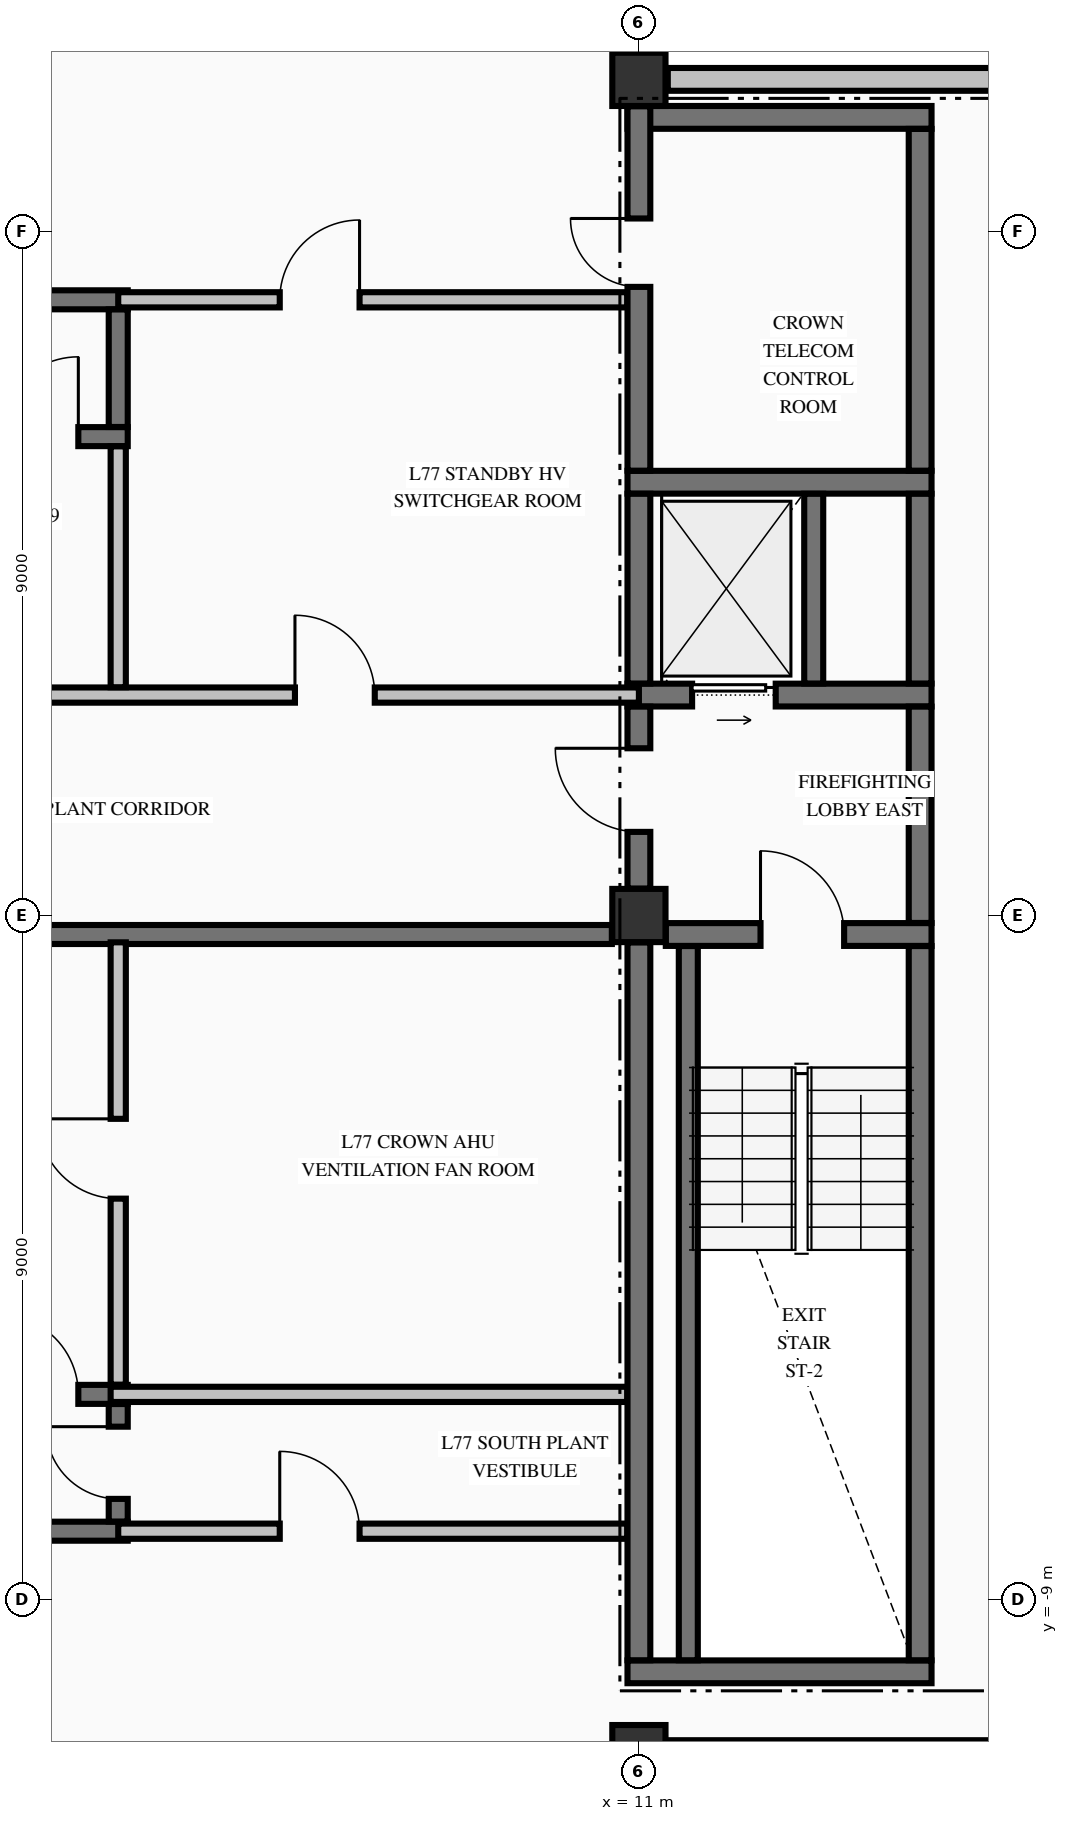
"""IFC4 building model, lengths in metres.
Left out: names, types, materials, properties, quantities, classifications, styles, units other than length and angle.
Written with IfcOpenShell. Run it as: python <this file> out.ifc"""

import sys

from ifc_helpers import new_model, si_unit, direction, frame, frame_2d, origin, origin_2d, place, context, subcontext, project, spatial, rectangle, extrude, element, fill, save


model = new_model("IFC4")
c1 = context("Model", 3, precision=1e-05, world=origin(), true_north=direction((0.0, 1.0)))
c2 = subcontext(c1, "Body", "Model", "MODEL_VIEW")
j1 = project(units=[si_unit("LENGTHUNIT", "METRE"), si_unit("PLANEANGLEUNIT", "RADIAN")], contexts=[c1])
p1 = place(None, origin())
s1 = spatial("IfcSite", under=j1, at=p1, CompositionType="ELEMENT")
p2 = place(p1, origin())
s2 = spatial("IfcBuilding", under=s1, at=p2, CompositionType="ELEMENT")
p3 = place(p2, frame((0.0, 0.0, 287.92)))
s3 = spatial("IfcBuildingStorey", under=s2, at=p3, CompositionType="ELEMENT", Elevation=287.92)
for number, where, z_axis, x_axis in (
    (1, (11.0, -11.0, -0.325), (0.0, 0.0, 1.0), (1.0, 0.0, 0.0)),
    (2, (11.0, 11.0, -0.325), (0.0, 0.0, 1.0), (1.0, 0.0, 0.0)),
    (3, (11.0, 0.0, -0.325), (0.0, 0.0, 1.0), (1.0, 0.0, 0.0)),
):
    element("IfcColumn", number, at=place(p3, frame(where, z_axis=z_axis, x_axis=x_axis)), inside=s3, PredefinedType="COLUMN", context=c2, shape_type="SweptSolid", body=[
        extrude(rectangle(XDim=0.7, YDim=0.7, at=origin_2d()), origin(), (0.0, 0.0, 1.0), 3.06),
    ])
for number, where, z_axis, x_axis in (
    (4, (11.38, -11.0, 0.0), (0.0, 0.0, 1.0), (1.0, 0.0, 0.0)),
    (5, (16.62, 11.0, 0.0), (0.0, 0.0, 1.0), (-1.0, 0.0, 0.0)),
):
    element("IfcWall", number, at=place(p3, frame(where, z_axis=z_axis, x_axis=x_axis)), inside=s3, PredefinedType="STANDARD", context=c2, shape_type="SweptSolid", body=[
        extrude(rectangle(XDim=5.24, YDim=0.3, at=frame_2d((2.62, 0.0))), origin(), (0.0, 0.0, 1.0), 1.077),
    ])
p4 = place(p3, frame((10.85, -9.95, 0.0), z_axis=(0.0, 0.0, 1.0), x_axis=(1.0, 0.0, 0.0)))
e6 = element("IfcWall", 6, at=p4, inside=s3, PredefinedType="SHEAR", context=c2, shape_type="SweptSolid", body=[
    extrude(rectangle(XDim=4.0, YDim=0.3, at=frame_2d((2.0, 0.0))), origin(), (0.0, 0.0, 1.0), 2.735),
])
p5 = place(p3, frame((-4.475, -8.1, 0.0), z_axis=(0.0, 0.0, 1.0), x_axis=(1.0, 0.0, 0.0)))
e7 = element("IfcWall", 7, at=p5, inside=s3, PredefinedType="SOLIDWALL", context=c2, shape_type="SweptSolid", body=[
    extrude(rectangle(XDim=8.75, YDim=0.25, at=frame_2d((4.375, 0.0))), origin(), (0.0, 0.0, 1.0), 2.735),
])
p6 = place(p3, frame((-4.475, -6.3, 0.0), z_axis=(0.0, 0.0, 1.0), x_axis=(1.0, 0.0, 0.0)))
e8 = element("IfcWall", 8, at=p6, inside=s3, PredefinedType="SOLIDWALL", context=c2, shape_type="SweptSolid", body=[
    extrude(rectangle(XDim=8.75, YDim=0.25, at=frame_2d((4.375, 0.0))), origin(), (0.0, 0.0, 1.0), 2.735),
])
p7 = place(p6, frame((7.05, 0.0, 0.0)))
e9 = element("IfcOpeningElement", 9, at=p7, cuts=e8, PredefinedType="OPENING", context=c2, shape_type="SweptSolid", body=[
    extrude(rectangle(XDim=1.05, YDim=2.15, at=frame_2d((0.525, 1.075))), frame((0.0, 0.135, 0.0), z_axis=(0.0, -1.0, 0.0), x_axis=(1.0, 0.0, 0.0)), (0.0, 0.0, 1.0), 0.27),
])
p8 = place(p3, frame((11.354, -0.25, 0.0), z_axis=(0.0, 0.0, 1.0), x_axis=(1.0, 0.0, 0.0)))
e10 = element("IfcWall", 10, at=p8, inside=s3, PredefinedType="SHEAR", context=c2, shape_type="SweptSolid", body=[
    extrude(rectangle(XDim=3.496, YDim=0.3, at=frame_2d((1.748, 0.0))), origin(), (0.0, 0.0, 1.0), 2.735),
])
p9 = place(p8, frame((1.246, 0.0, 0.0)))
e11 = element("IfcOpeningElement", 11, at=p9, cuts=e10, PredefinedType="OPENING", context=c2, shape_type="SweptSolid", body=[
    extrude(rectangle(XDim=1.1, YDim=2.15, at=frame_2d((0.55, 1.075))), frame((0.0, 0.16, 0.0), z_axis=(0.0, -1.0, 0.0), x_axis=(1.0, 0.0, 0.0)), (0.0, 0.0, 1.0), 0.32),
])
p10 = place(p3, frame((10.85, 2.9, 0.0), z_axis=(0.0, 0.0, 1.0), x_axis=(1.0, 0.0, 0.0)))
e12 = element("IfcWall", 12, at=p10, inside=s3, PredefinedType="SHEAR", context=c2, shape_type="SweptSolid", body=[
    extrude(rectangle(XDim=4.0, YDim=0.3, at=frame_2d((2.0, 0.0))), origin(), (0.0, 0.0, 1.0), 2.735),
])
p11 = place(p10, frame((0.85, 0.0, 0.0)))
e13 = element("IfcOpeningElement", 13, at=p11, cuts=e12, PredefinedType="OPENING", context=c2, shape_type="SweptSolid", body=[
    extrude(rectangle(XDim=1.1, YDim=2.2, at=frame_2d((0.55, 1.1))), frame((0.0, 0.16, 0.0), z_axis=(0.0, -1.0, 0.0), x_axis=(1.0, 0.0, 0.0)), (0.0, 0.0, 1.0), 0.32),
])
p12 = place(p3, frame((10.85, 5.7, 0.0), z_axis=(0.0, 0.0, 1.0), x_axis=(1.0, 0.0, 0.0)))
e14 = element("IfcWall", 14, at=p12, inside=s3, PredefinedType="SHEAR", context=c2, shape_type="SweptSolid", body=[
    extrude(rectangle(XDim=4.0, YDim=0.3, at=frame_2d((2.0, 0.0))), origin(), (0.0, 0.0, 1.0), 2.735),
])
p13 = place(p3, frame((-4.475, 6.3, 0.0), z_axis=(0.0, 0.0, 1.0), x_axis=(1.0, 0.0, 0.0)))
e15 = element("IfcWall", 15, at=p13, inside=s3, PredefinedType="SOLIDWALL", context=c2, shape_type="SweptSolid", body=[
    extrude(rectangle(XDim=8.75, YDim=0.25, at=frame_2d((4.375, 0.0))), origin(), (0.0, 0.0, 1.0), 2.735),
])
p14 = place(p13, frame((7.05, 0.0, 0.0)))
e16 = element("IfcOpeningElement", 16, at=p14, cuts=e15, PredefinedType="OPENING", context=c2, shape_type="SweptSolid", body=[
    extrude(rectangle(XDim=1.05, YDim=2.15, at=frame_2d((0.525, 1.075))), frame((0.0, 0.135, 0.0), z_axis=(0.0, -1.0, 0.0), x_axis=(1.0, 0.0, 0.0)), (0.0, 0.0, 1.0), 0.27),
])
p15 = place(p3, frame((-4.475, 8.1, 0.0), z_axis=(0.0, 0.0, 1.0), x_axis=(1.0, 0.0, 0.0)))
e17 = element("IfcWall", 17, at=p15, inside=s3, PredefinedType="SOLIDWALL", context=c2, shape_type="SweptSolid", body=[
    extrude(rectangle(XDim=8.75, YDim=0.25, at=frame_2d((4.375, 0.0))), origin(), (0.0, 0.0, 1.0), 2.735),
])
p16 = place(p3, frame((10.85, 10.5, 0.0), z_axis=(0.0, 0.0, 1.0), x_axis=(1.0, 0.0, 0.0)))
e18 = element("IfcWall", 18, at=p16, inside=s3, PredefinedType="SHEAR", context=c2, shape_type="SweptSolid", body=[
    extrude(rectangle(XDim=4.0, YDim=0.3, at=frame_2d((2.0, 0.0))), origin(), (0.0, 0.0, 1.0), 2.735),
])
p17 = place(p3, frame((4.15, -8.1, 0.0), z_axis=(0.0, 0.0, 1.0), x_axis=(1.0, 0.0, 0.0)))
e19 = element("IfcWall", 19, at=p17, inside=s3, PredefinedType="PARTITIONING", context=c2, shape_type="SweptSolid", body=[
    extrude(rectangle(XDim=6.697, YDim=0.2, at=frame_2d((3.349, 0.0))), origin(), (0.0, 0.0, 1.0), 2.735),
])
p18 = place(p17, frame((2.125, 0.0, 0.0)))
e20 = element("IfcOpeningElement", 20, at=p18, cuts=e19, PredefinedType="OPENING", context=c2, shape_type="SweptSolid", body=[
    extrude(rectangle(XDim=1.05, YDim=2.15, at=frame_2d((0.525, 1.075))), frame((0.0, 0.11, 0.0), z_axis=(0.0, -1.0, 0.0), x_axis=(1.0, 0.0, 0.0)), (0.0, 0.0, 1.0), 0.22),
])
p19 = place(p3, frame((4.05, -6.3, 0.0), z_axis=(0.0, 0.0, 1.0), x_axis=(1.0, 0.0, 0.0)))
e21 = element("IfcWall", 21, at=p19, inside=s3, PredefinedType="PARTITIONING", context=c2, shape_type="SweptSolid", body=[
    extrude(rectangle(XDim=6.797, YDim=0.2, at=frame_2d((3.398, 0.0))), origin(), (0.0, 0.0, 1.0), 2.735),
])
p20 = place(p3, frame((-10.644, -0.25, 0.0), z_axis=(0.0, 0.0, 1.0), x_axis=(1.0, 0.0, 0.0)))
e22 = element("IfcWall", 22, at=p20, inside=s3, PredefinedType="SOLIDWALL", context=c2, shape_type="SweptSolid", body=[
    extrude(rectangle(XDim=21.288, YDim=0.25, at=frame_2d((10.644, 0.0))), origin(), (0.0, 0.0, 1.0), 2.735),
])
p21 = place(p20, frame((7.594, 0.0, 0.0)))
e23 = element("IfcOpeningElement", 23, at=p21, cuts=e22, PredefinedType="OPENING", context=c2, shape_type="SweptSolid", body=[
    extrude(rectangle(XDim=0.95, YDim=2.02, at=frame_2d((0.475, 1.01))), frame((0.0, 0.135, 0.0), z_axis=(0.0, -1.0, 0.0), x_axis=(1.0, 0.0, 0.0)), (0.0, 0.0, 1.0), 0.27),
])
p22 = place(p3, frame((-11.0, 2.9, 0.0), z_axis=(0.0, 0.0, 1.0), x_axis=(1.0, 0.0, 0.0)))
e24 = element("IfcWall", 24, at=p22, inside=s3, PredefinedType="PARTITIONING", context=c2, shape_type="SweptSolid", body=[
    extrude(rectangle(XDim=22.0, YDim=0.2, at=frame_2d((11.0, 0.0))), origin(), (0.0, 0.0, 1.0), 2.735),
])
p23 = place(p22, frame((7.95, 0.0, 0.0)))
e25 = element("IfcOpeningElement", 25, at=p23, cuts=e24, PredefinedType="OPENING", context=c2, shape_type="SweptSolid", body=[
    extrude(rectangle(XDim=1.1, YDim=2.15, at=frame_2d((0.55, 1.075))), frame((0.0, 0.11, 0.0), z_axis=(0.0, -1.0, 0.0), x_axis=(1.0, 0.0, 0.0)), (0.0, 0.0, 1.0), 0.22),
])
p24 = place(p22, frame((17.475, 0.0, 0.0)))
e26 = element("IfcOpeningElement", 26, at=p24, cuts=e24, PredefinedType="OPENING", context=c2, shape_type="SweptSolid", body=[
    extrude(rectangle(XDim=1.05, YDim=2.15, at=frame_2d((0.525, 1.075))), frame((0.0, 0.11, 0.0), z_axis=(0.0, -1.0, 0.0), x_axis=(1.0, 0.0, 0.0)), (0.0, 0.0, 1.0), 0.22),
])
p25 = place(p22, frame((3.475, 0.0, 0.0)))
e27 = element("IfcOpeningElement", 27, at=p25, cuts=e24, PredefinedType="OPENING", context=c2, shape_type="SweptSolid", body=[
    extrude(rectangle(XDim=1.05, YDim=2.15, at=frame_2d((0.525, 1.075))), frame((0.0, 0.11, 0.0), z_axis=(0.0, -1.0, 0.0), x_axis=(1.0, 0.0, 0.0)), (0.0, 0.0, 1.0), 0.22),
])
p26 = place(p3, frame((4.15, 8.1, 0.0), z_axis=(0.0, 0.0, 1.0), x_axis=(1.0, 0.0, 0.0)))
e28 = element("IfcWall", 28, at=p26, inside=s3, PredefinedType="PARTITIONING", context=c2, shape_type="SweptSolid", body=[
    extrude(rectangle(XDim=6.697, YDim=0.2, at=frame_2d((3.349, 0.0))), origin(), (0.0, 0.0, 1.0), 2.735),
])
p27 = place(p26, frame((2.125, 0.0, 0.0)))
e29 = element("IfcOpeningElement", 29, at=p27, cuts=e28, PredefinedType="OPENING", context=c2, shape_type="SweptSolid", body=[
    extrude(rectangle(XDim=1.05, YDim=2.15, at=frame_2d((0.525, 1.075))), frame((0.0, 0.11, 0.0), z_axis=(0.0, -1.0, 0.0), x_axis=(1.0, 0.0, 0.0)), (0.0, 0.0, 1.0), 0.22),
])
p28 = place(p3, frame((4.15, -7.973, 0.0), z_axis=(0.0, 0.0, 1.0), x_axis=(0.0, 1.0, 0.0)))
e30 = element("IfcWall", 30, at=p28, inside=s3, PredefinedType="SOLIDWALL", context=c2, shape_type="SweptSolid", body=[
    extrude(rectangle(XDim=1.546, YDim=0.25, at=frame_2d((0.773, 0.0))), origin(), (0.0, 0.0, 1.0), 2.735),
])
p29 = place(p28, frame((0.298, 0.0, 0.0)))
e31 = element("IfcOpeningElement", 31, at=p29, cuts=e30, PredefinedType="OPENING", context=c2, shape_type="SweptSolid", body=[
    extrude(rectangle(XDim=0.95, YDim=2.15, at=frame_2d((0.475, 1.075))), frame((0.0, 0.135, 0.0), z_axis=(0.0, -1.0, 0.0), x_axis=(1.0, 0.0, 0.0)), (0.0, 0.0, 1.0), 0.27),
])
p30 = place(p3, frame((4.15, 6.427, 0.0), z_axis=(0.0, 0.0, 1.0), x_axis=(0.0, 1.0, 0.0)))
e32 = element("IfcWall", 32, at=p30, inside=s3, PredefinedType="SOLIDWALL", context=c2, shape_type="SweptSolid", body=[
    extrude(rectangle(XDim=1.546, YDim=0.25, at=frame_2d((0.773, 0.0))), origin(), (0.0, 0.0, 1.0), 2.735),
])
p31 = place(p3, frame((11.0, -9.798, 0.0), z_axis=(0.0, 0.0, 1.0), x_axis=(0.0, 1.0, 0.0)))
e33 = element("IfcWall", 33, at=p31, inside=s3, PredefinedType="SHEAR", context=c2, shape_type="SweptSolid", body=[
    extrude(rectangle(XDim=9.444, YDim=0.3, at=frame_2d((4.722, 0.0))), origin(), (0.0, 0.0, 1.0), 2.735),
])
p32 = place(p3, frame((11.0, 0.354, 0.0), z_axis=(0.0, 0.0, 1.0), x_axis=(0.0, 1.0, 0.0)))
e34 = element("IfcWall", 34, at=p32, inside=s3, PredefinedType="SHEAR", context=c2, shape_type="SweptSolid", body=[
    extrude(rectangle(XDim=2.394, YDim=0.3, at=frame_2d((1.197, 0.0))), origin(), (0.0, 0.0, 1.0), 2.735),
])
p33 = place(p32, frame((0.746, 0.0, 0.0)))
e35 = element("IfcOpeningElement", 35, at=p33, cuts=e34, PredefinedType="OPENING", context=c2, shape_type="SweptSolid", body=[
    extrude(rectangle(XDim=1.1, YDim=2.15, at=frame_2d((0.55, 1.075))), frame((0.0, 0.16, 0.0), z_axis=(0.0, -1.0, 0.0), x_axis=(1.0, 0.0, 0.0)), (0.0, 0.0, 1.0), 0.32),
])
p34 = place(p3, frame((11.0, 3.052, 0.0), z_axis=(0.0, 0.0, 1.0), x_axis=(0.0, 1.0, 0.0)))
e36 = element("IfcWall", 36, at=p34, inside=s3, PredefinedType="SHEAR", context=c2, shape_type="SweptSolid", body=[
    extrude(rectangle(XDim=2.496, YDim=0.3, at=frame_2d((1.248, 0.0))), origin(), (0.0, 0.0, 1.0), 2.735),
])
p35 = place(p3, frame((11.0, 5.852, 0.0), z_axis=(0.0, 0.0, 1.0), x_axis=(0.0, 1.0, 0.0)))
e37 = element("IfcWall", 37, at=p35, inside=s3, PredefinedType="SHEAR", context=c2, shape_type="SweptSolid", body=[
    extrude(rectangle(XDim=4.794, YDim=0.3, at=frame_2d((2.397, 0.0))), origin(), (0.0, 0.0, 1.0), 2.735),
])
p36 = place(p35, frame((2.418, 0.0, 0.0)))
e38 = element("IfcOpeningElement", 38, at=p36, cuts=e37, PredefinedType="OPENING", context=c2, shape_type="SweptSolid", body=[
    extrude(rectangle(XDim=0.9, YDim=2.15, at=frame_2d((0.45, 1.075))), frame((0.0, 0.16, 0.0), z_axis=(0.0, -1.0, 0.0), x_axis=(1.0, 0.0, 0.0)), (0.0, 0.0, 1.0), 0.32),
])
p37 = place(p3, frame((11.65, -9.798, 0.0), z_axis=(0.0, 0.0, 1.0), x_axis=(0.0, 1.0, 0.0)))
e39 = element("IfcWall", 39, at=p37, inside=s3, PredefinedType="SOLIDWALL", context=c2, shape_type="SweptSolid", body=[
    extrude(rectangle(XDim=9.396, YDim=0.25, at=frame_2d((4.698, 0.0))), origin(), (0.0, 0.0, 1.0), 2.735),
])
p38 = place(p3, frame((13.3, 3.052, 0.0), z_axis=(0.0, 0.0, 1.0), x_axis=(0.0, 1.0, 0.0)))
e40 = element("IfcWall", 40, at=p38, inside=s3, PredefinedType="SOLIDWALL", context=c2, shape_type="SweptSolid", body=[
    extrude(rectangle(XDim=2.496, YDim=0.25, at=frame_2d((1.248, 0.0))), origin(), (0.0, 0.0, 1.0), 2.735),
])
p39 = place(p3, frame((14.7, -9.798, 0.0), z_axis=(0.0, 0.0, 1.0), x_axis=(0.0, 1.0, 0.0)))
e41 = element("IfcWall", 41, at=p39, inside=s3, PredefinedType="SHEAR", context=c2, shape_type="SweptSolid", body=[
    extrude(rectangle(XDim=9.396, YDim=0.3, at=frame_2d((4.698, 0.0))), origin(), (0.0, 0.0, 1.0), 2.735),
])
p40 = place(p3, frame((14.7, -0.098, 0.0), z_axis=(0.0, 0.0, 1.0), x_axis=(0.0, 1.0, 0.0)))
e42 = element("IfcWall", 42, at=p40, inside=s3, PredefinedType="SHEAR", context=c2, shape_type="SweptSolid", body=[
    extrude(rectangle(XDim=2.846, YDim=0.3, at=frame_2d((1.423, 0.0))), origin(), (0.0, 0.0, 1.0), 2.735),
])
p41 = place(p3, frame((14.7, 3.052, 0.0), z_axis=(0.0, 0.0, 1.0), x_axis=(0.0, 1.0, 0.0)))
e43 = element("IfcWall", 43, at=p41, inside=s3, PredefinedType="SHEAR", context=c2, shape_type="SweptSolid", body=[
    extrude(rectangle(XDim=2.496, YDim=0.3, at=frame_2d((1.248, 0.0))), origin(), (0.0, 0.0, 1.0), 2.735),
])
p42 = place(p3, frame((14.7, 5.852, 0.0), z_axis=(0.0, 0.0, 1.0), x_axis=(0.0, 1.0, 0.0)))
e44 = element("IfcWall", 44, at=p42, inside=s3, PredefinedType="SHEAR", context=c2, shape_type="SweptSolid", body=[
    extrude(rectangle(XDim=4.496, YDim=0.3, at=frame_2d((2.248, 0.0))), origin(), (0.0, 0.0, 1.0), 2.735),
])
p43 = place(p3, frame((4.15, -6.172, 0.0), z_axis=(0.0, 0.0, 1.0), x_axis=(0.0, 1.0, 0.0)))
e45 = element("IfcWall", 45, at=p43, inside=s3, PredefinedType="PARTITIONING", context=c2, shape_type="SweptSolid", body=[
    extrude(rectangle(XDim=5.819, YDim=0.2, at=frame_2d((2.91, 0.0))), origin(), (0.0, 0.0, 1.0), 2.735),
])
p44 = place(p43, frame((2.447, 0.0, 0.0)))
e46 = element("IfcOpeningElement", 46, at=p44, cuts=e45, PredefinedType="OPENING", context=c2, shape_type="SweptSolid", body=[
    extrude(rectangle(XDim=1.05, YDim=2.15, at=frame_2d((0.525, 1.075))), frame((0.0, 0.11, 0.0), z_axis=(0.0, -1.0, 0.0), x_axis=(1.0, 0.0, 0.0)), (0.0, 0.0, 1.0), 0.22),
])
p45 = place(p3, frame((4.15, 3.003, 0.0), z_axis=(0.0, 0.0, 1.0), x_axis=(0.0, 1.0, 0.0)))
e47 = element("IfcWall", 47, at=p45, inside=s3, PredefinedType="PARTITIONING", context=c2, shape_type="SweptSolid", body=[
    extrude(rectangle(XDim=3.169, YDim=0.2, at=frame_2d((1.584, 0.0))), origin(), (0.0, 0.0, 1.0), 2.735),
])
p46 = place(p9, origin())
e48 = element("IfcDoor", 48, at=p46, inside=s3, OperationType="SINGLE_SWING_LEFT", PredefinedType="DOOR", context=c2, shape_type="SweptSolid", body=[
    extrude(rectangle(XDim=1.1, YDim=2.15, at=frame_2d((0.55, 1.075))), frame((0.0, 0.025, 0.0), z_axis=(0.0, -1.0, 0.0), x_axis=(1.0, 0.0, 0.0)), (0.0, 0.0, 1.0), 0.05),
])
fill(e11, e48)
p47 = place(p33, origin())
e49 = element("IfcDoor", 49, at=p47, inside=s3, OperationType="SINGLE_SWING_RIGHT", PredefinedType="DOOR", context=c2, shape_type="SweptSolid", body=[
    extrude(rectangle(XDim=1.1, YDim=2.15, at=frame_2d((0.55, 1.075))), frame((0.0, 0.025, 0.0), z_axis=(0.0, -1.0, 0.0), x_axis=(1.0, 0.0, 0.0)), (0.0, 0.0, 1.0), 0.05),
])
fill(e35, e49)
p48 = place(p11, origin())
e50 = element("IfcDoor", 50, at=p48, inside=s3, OperationType="SLIDING_TO_RIGHT", PredefinedType="DOOR", context=c2, shape_type="SweptSolid", body=[
    extrude(rectangle(XDim=1.1, YDim=2.2, at=frame_2d((0.55, 1.1))), frame((0.0, 0.025, 0.0), z_axis=(0.0, -1.0, 0.0), x_axis=(1.0, 0.0, 0.0)), (0.0, 0.0, 1.0), 0.05),
])
fill(e13, e50)
p49 = place(p36, origin())
e51 = element("IfcDoor", 51, at=p49, inside=s3, OperationType="SINGLE_SWING_RIGHT", PredefinedType="DOOR", context=c2, shape_type="SweptSolid", body=[
    extrude(rectangle(XDim=0.9, YDim=2.15, at=frame_2d((0.45, 1.075))), frame((0.0, 0.025, 0.0), z_axis=(0.0, -1.0, 0.0), x_axis=(1.0, 0.0, 0.0)), (0.0, 0.0, 1.0), 0.05),
])
fill(e38, e51)
p50 = place(p7, origin())
e52 = element("IfcDoor", 52, at=p50, inside=s3, OperationType="SINGLE_SWING_LEFT", PredefinedType="DOOR", context=c2, shape_type="SweptSolid", body=[
    extrude(rectangle(XDim=1.05, YDim=2.15, at=frame_2d((0.525, 1.075))), frame((0.0, 0.025, 0.0), z_axis=(0.0, -1.0, 0.0), x_axis=(1.0, 0.0, 0.0)), (0.0, 0.0, 1.0), 0.05),
])
fill(e9, e52)
p51 = place(p14, origin())
e53 = element("IfcDoor", 53, at=p51, inside=s3, OperationType="SINGLE_SWING_RIGHT", PredefinedType="DOOR", context=c2, shape_type="SweptSolid", body=[
    extrude(rectangle(XDim=1.05, YDim=2.15, at=frame_2d((0.525, 1.075))), frame((0.0, 0.025, 0.0), z_axis=(0.0, -1.0, 0.0), x_axis=(1.0, 0.0, 0.0)), (0.0, 0.0, 1.0), 0.05),
])
fill(e16, e53)
p52 = place(p44, origin())
e54 = element("IfcDoor", 54, at=p52, inside=s3, OperationType="SINGLE_SWING_RIGHT", PredefinedType="DOOR", context=c2, shape_type="SweptSolid", body=[
    extrude(rectangle(XDim=1.05, YDim=2.15, at=frame_2d((0.525, 1.075))), frame((0.0, 0.025, 0.0), z_axis=(0.0, -1.0, 0.0), x_axis=(1.0, 0.0, 0.0)), (0.0, 0.0, 1.0), 0.05),
])
fill(e46, e54)
p53 = place(p24, origin())
e55 = element("IfcDoor", 55, at=p53, inside=s3, OperationType="SINGLE_SWING_LEFT", PredefinedType="DOOR", context=c2, shape_type="SweptSolid", body=[
    extrude(rectangle(XDim=1.05, YDim=2.15, at=frame_2d((0.525, 1.075))), frame((0.0, 0.025, 0.0), z_axis=(0.0, -1.0, 0.0), x_axis=(1.0, 0.0, 0.0)), (0.0, 0.0, 1.0), 0.05),
])
fill(e26, e55)
p54 = place(p27, origin())
e56 = element("IfcDoor", 56, at=p54, inside=s3, OperationType="SINGLE_SWING_RIGHT", PredefinedType="DOOR", context=c2, shape_type="SweptSolid", body=[
    extrude(rectangle(XDim=1.05, YDim=2.15, at=frame_2d((0.525, 1.075))), frame((0.0, 0.025, 0.0), z_axis=(0.0, -1.0, 0.0), x_axis=(1.0, 0.0, 0.0)), (0.0, 0.0, 1.0), 0.05),
])
fill(e29, e56)
p55 = place(p29, origin())
e57 = element("IfcDoor", 57, at=p55, inside=s3, OperationType="SINGLE_SWING_RIGHT", PredefinedType="DOOR", context=c2, shape_type="SweptSolid", body=[
    extrude(rectangle(XDim=0.95, YDim=2.15, at=frame_2d((0.475, 1.075))), frame((0.0, 0.025, 0.0), z_axis=(0.0, -1.0, 0.0), x_axis=(1.0, 0.0, 0.0)), (0.0, 0.0, 1.0), 0.05),
])
fill(e31, e57)
p56 = place(p18, origin())
e58 = element("IfcDoor", 58, at=p56, inside=s3, OperationType="SINGLE_SWING_LEFT", PredefinedType="DOOR", context=c2, shape_type="SweptSolid", body=[
    extrude(rectangle(XDim=1.05, YDim=2.15, at=frame_2d((0.525, 1.075))), frame((0.0, 0.025, 0.0), z_axis=(0.0, -1.0, 0.0), x_axis=(1.0, 0.0, 0.0)), (0.0, 0.0, 1.0), 0.05),
])
fill(e20, e58)
save(model, sys.argv[1])
